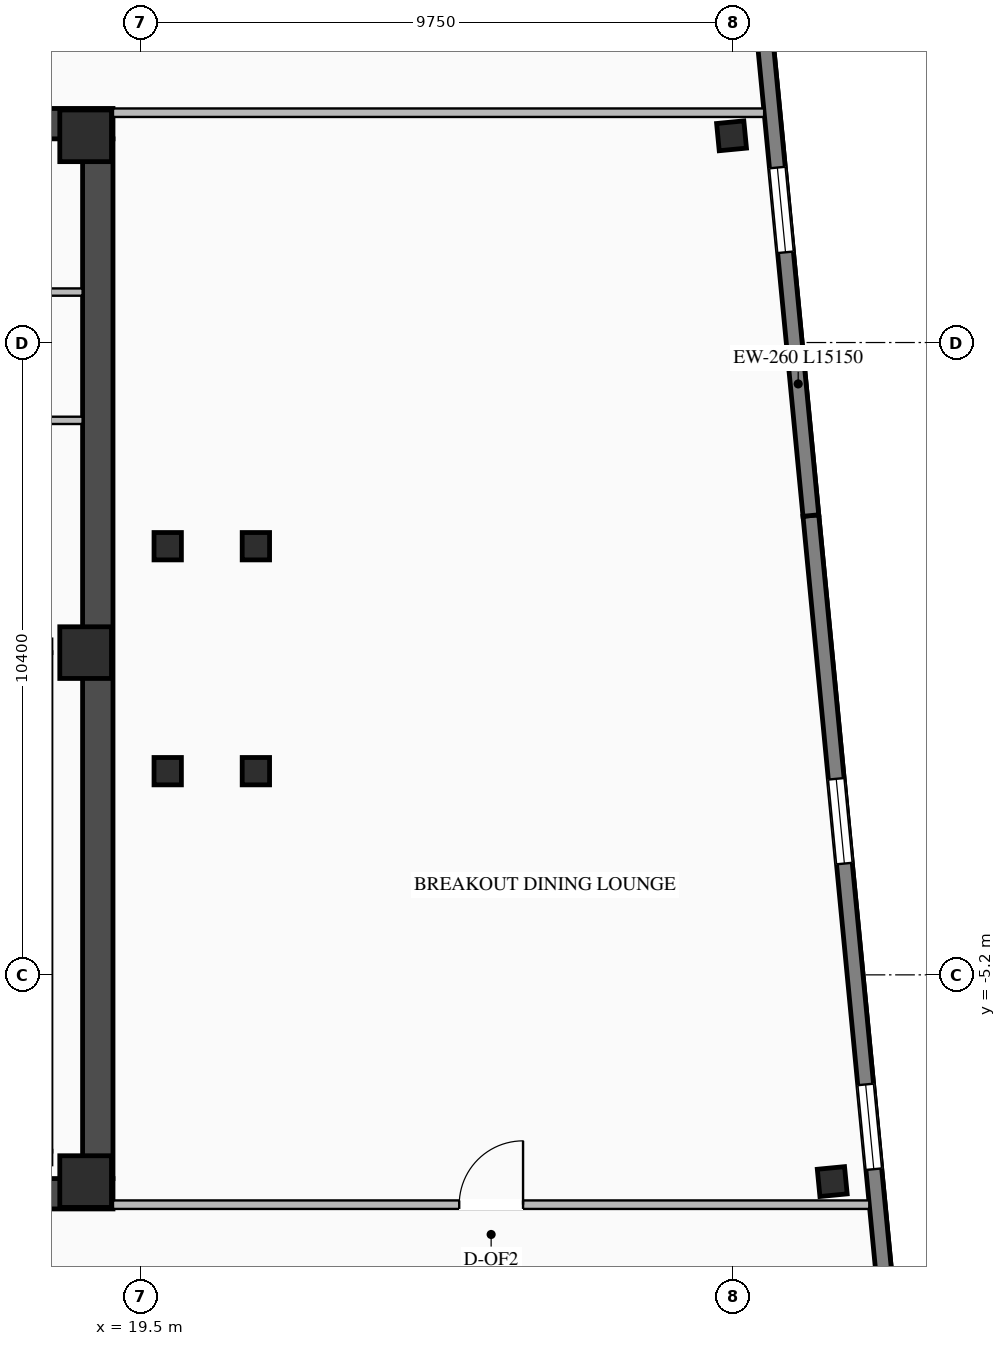
"""IFC4 building model, lengths in metres.
Left out: names, types, materials, properties, quantities, classifications, styles, units other than length and angle.
Written with IfcOpenShell. Run it as: python <this file> out.ifc"""

import sys

from ifc_helpers import new_model, si_unit, direction, frame, frame_2d, origin, origin_2d, place, context, subcontext, project, spatial, rectangle, i_section, extrude, element, fill, save


model = new_model("IFC4")
c1 = context("Model", 3, precision=1e-05, world=origin(), true_north=direction((0.0, 1.0)))
c2 = subcontext(c1, "Body", "Model", "MODEL_VIEW")
j1 = project(units=[si_unit("LENGTHUNIT", "METRE"), si_unit("PLANEANGLEUNIT", "RADIAN")], contexts=[c1])
p1 = place(None, origin())
s1 = spatial("IfcSite", under=j1, at=p1, CompositionType="ELEMENT")
p2 = place(p1, origin())
s2 = spatial("IfcBuilding", under=s1, at=p2, CompositionType="ELEMENT")
p3 = place(p2, frame((0.0, 0.0, 282.75)))
s3 = spatial("IfcBuildingStorey", under=s2, at=p3, CompositionType="ELEMENT", Elevation=282.75)
p4 = place(p3, frame((8.8, -8.8, 0.0), z_axis=(0.0, 0.0, 1.0), x_axis=(1.0, 0.0, 0.0)))
e1 = element("IfcWall", 1, at=p4, inside=s3, PredefinedType="SHEAR", context=c2, shape_type="SweptSolid", body=[
    extrude(rectangle(XDim=10.25, YDim=0.5, at=frame_2d((5.125, 0.0))), origin(), (0.0, 0.0, 1.0), 3.95),
])
p5 = place(p3, frame((8.8, 8.8, 0.0), z_axis=(0.0, 0.0, 1.0), x_axis=(1.0, 0.0, 0.0)))
e2 = element("IfcWall", 2, at=p5, inside=s3, PredefinedType="SHEAR", context=c2, shape_type="SweptSolid", body=[
    extrude(rectangle(XDim=10.25, YDim=0.5, at=frame_2d((5.125, 0.0))), origin(), (0.0, 0.0, 1.0), 3.95),
])
p6 = place(p5, frame((3.25, 0.0, 0.0)))
e3 = element("IfcOpeningElement", 3, at=p6, cuts=e2, PredefinedType="OPENING", context=c2, shape_type="SweptSolid", body=[
    extrude(rectangle(XDim=1.4, YDim=2.05, at=frame_2d((0.7, 1.025))), frame((0.0, 0.26, 0.0), z_axis=(0.0, -1.0, 0.0), x_axis=(1.0, 0.0, 0.0)), (0.0, 0.0, 1.0), 0.52),
])
p7 = place(p3, frame((18.8, -8.55, 0.0), z_axis=(0.0, 0.0, 1.0), x_axis=(0.0, 1.0, 0.0)))
e4 = element("IfcWall", 4, at=p7, inside=s3, PredefinedType="SHEAR", context=c2, shape_type="SweptSolid", body=[
    extrude(rectangle(XDim=17.1, YDim=0.5, at=frame_2d((8.55, 0.0))), origin(), (0.0, 0.0, 1.0), 3.95),
])
for number, where, z_axis, x_axis in (
    (5, (18.6, -8.6, 0.0), (0.0, 0.0, 1.0), (1.0, 0.0, 0.0)),
    (6, (18.6, 0.1, 0.0), (0.0, 0.0, 1.0), (1.0, 0.0, 0.0)),
    (7, (18.6, 8.6, 0.0), (0.0, 0.0, 1.0), (1.0, 0.0, 0.0)),
):
    element("IfcColumn", number, at=place(p3, frame(where, z_axis=z_axis, x_axis=x_axis)), inside=s3, PredefinedType="COLUMN", context=c2, shape_type="SweptSolid", body=[
        extrude(rectangle(XDim=0.85, YDim=0.85, at=origin_2d()), origin(), (0.0, 0.0, 1.0), 4.2),
    ])
for number, where, z_axis, x_axis in (
    (8, (19.95, -1.85, 0.0), (0.0, 0.0, 1.0), (1.0, 0.0, 0.0)),
    (9, (19.95, 1.85, 0.0), (0.0, 0.0, 1.0), (1.0, 0.0, 0.0)),
    (10, (21.4, -1.85, 0.0), (0.0, 0.0, 1.0), (1.0, 0.0, 0.0)),
    (11, (21.4, 1.85, 0.0), (0.0, 0.0, 1.0), (1.0, 0.0, 0.0)),
    (12, (30.879, -8.6, 0.0), (0.0, 0.0, 1.0), (0.995, 0.096, 0.0)),
    (13, (29.223, 8.6, 0.0), (0.0, 0.0, 1.0), (0.995, 0.096, 0.0)),
):
    element("IfcColumn", number, at=place(p3, frame(where, z_axis=z_axis, x_axis=x_axis)), inside=s3, PredefinedType="COLUMN", context=c2, shape_type="SweptSolid", body=[
        extrude(i_section(OverallWidth=0.45, OverallDepth=0.45, WebThickness=0.022, FlangeThickness=0.032, at=origin_2d()), origin(), (0.0, 0.0, 1.0), 4.2),
    ])
p8 = place(p3, frame((30.527, 2.354, 0.0), z_axis=(0.0, 0.0, 1.0), x_axis=(0.095850890337, -0.995395703638, 0.0)))
e14 = element("IfcWall", 14, at=p8, inside=s3, PredefinedType="STANDARD", context=c2, shape_type="SweptSolid", body=[
    extrude(rectangle(XDim=15.15, YDim=0.26, at=frame_2d((7.575, 0.0))), origin(), (0.0, 0.0, 1.0), 3.93),
])
p9 = place(p8, frame((4.35, 0.0, 0.76)))
e15 = element("IfcOpeningElement", 15, at=p9, cuts=e14, PredefinedType="OPENING", context=c2, shape_type="SweptSolid", body=[
    extrude(rectangle(XDim=1.4, YDim=1.95, at=frame_2d((0.7, 0.975))), frame((0.0, 0.14, 0.0), z_axis=(0.0, -1.0, 0.0), x_axis=(1.0, 0.0, 0.0)), (0.0, 0.0, 1.0), 0.28),
])
p10 = place(p8, frame((9.4, 0.0, 0.76)))
e16 = element("IfcOpeningElement", 16, at=p10, cuts=e14, PredefinedType="OPENING", context=c2, shape_type="SweptSolid", body=[
    extrude(rectangle(XDim=1.4, YDim=1.95, at=frame_2d((0.7, 0.975))), frame((0.0, 0.14, 0.0), z_axis=(0.0, -1.0, 0.0), x_axis=(1.0, 0.0, 0.0)), (0.0, 0.0, 1.0), 0.28),
])
p11 = place(p3, frame((29.075, 17.435, 0.0), z_axis=(0.0, 0.0, 1.0), x_axis=(0.095850890337, -0.995395703638, 0.0)))
e17 = element("IfcWall", 17, at=p11, inside=s3, PredefinedType="STANDARD", context=c2, shape_type="SweptSolid", body=[
    extrude(rectangle(XDim=15.15, YDim=0.26, at=frame_2d((7.575, 0.0))), origin(), (0.0, 0.0, 1.0), 3.93),
])
p12 = place(p11, frame((4.35, 0.0, 0.76)))
e18 = element("IfcOpeningElement", 18, at=p12, cuts=e17, PredefinedType="OPENING", context=c2, shape_type="SweptSolid", body=[
    extrude(rectangle(XDim=1.4, YDim=1.95, at=frame_2d((0.7, 0.975))), frame((0.0, 0.14, 0.0), z_axis=(0.0, -1.0, 0.0), x_axis=(1.0, 0.0, 0.0)), (0.0, 0.0, 1.0), 0.28),
])
p13 = place(p11, frame((9.4, 0.0, 0.76)))
e19 = element("IfcOpeningElement", 19, at=p13, cuts=e17, PredefinedType="OPENING", context=c2, shape_type="SweptSolid", body=[
    extrude(rectangle(XDim=1.4, YDim=1.95, at=frame_2d((0.7, 0.975))), frame((0.0, 0.14, 0.0), z_axis=(0.0, -1.0, 0.0), x_axis=(1.0, 0.0, 0.0)), (0.0, 0.0, 1.0), 0.28),
])
p14 = place(p3, frame((13.9, 3.92, 0.0), z_axis=(0.0, 0.0, 1.0), x_axis=(1.0, 0.0, 0.0)))
e20 = element("IfcWall", 20, at=p14, inside=s3, PredefinedType="STANDARD", context=c2, shape_type="SweptSolid", body=[
    extrude(rectangle(XDim=4.65, YDim=0.12, at=frame_2d((2.325, 0.0))), origin(), (0.0, 0.0, 1.0), 3.93),
])
p15 = place(p3, frame((16.15, 6.03, 0.0), z_axis=(0.0, 0.0, 1.0), x_axis=(1.0, 0.0, 0.0)))
e21 = element("IfcWall", 21, at=p15, inside=s3, PredefinedType="STANDARD", context=c2, shape_type="SweptSolid", body=[
    extrude(rectangle(XDim=2.4, YDim=0.12, at=frame_2d((1.2, 0.0))), origin(), (0.0, 0.0, 1.0), 3.93),
])
p16 = place(p3, frame((19.05, 8.98, 0.0), z_axis=(0.0, 0.0, 1.0), x_axis=(1.0, 0.0, 0.0)))
e22 = element("IfcWall", 22, at=p16, inside=s3, PredefinedType="STANDARD", context=c2, shape_type="SweptSolid", body=[
    extrude(rectangle(XDim=10.709, YDim=0.14, at=frame_2d((5.354, 0.0))), origin(), (0.0, 0.0, 1.0), 3.93),
])
p17 = place(p3, frame((19.05, -8.98, 0.0), z_axis=(0.0, 0.0, 1.0), x_axis=(1.0, 0.0, 0.0)))
e23 = element("IfcWall", 23, at=p17, inside=s3, PredefinedType="STANDARD", context=c2, shape_type="SweptSolid", body=[
    extrude(rectangle(XDim=12.438, YDim=0.14, at=frame_2d((6.219, 0.0))), origin(), (0.0, 0.0, 1.0), 3.93),
])
p18 = place(p17, frame((5.694, 0.0, 0.0)))
e24 = element("IfcOpeningElement", 24, at=p18, cuts=e23, PredefinedType="OPENING", context=c2, shape_type="SweptSolid", body=[
    extrude(rectangle(XDim=1.05, YDim=2.08, at=frame_2d((0.525, 1.04))), frame((0.0, 0.08, 0.0), z_axis=(0.0, -1.0, 0.0), x_axis=(1.0, 0.0, 0.0)), (0.0, 0.0, 1.0), 0.16),
])
p19 = place(p9, origin())
e25 = element("IfcWindow", 25, at=p19, inside=s3, PartitioningType="SINGLE_PANEL", PredefinedType="WINDOW", context=c2, shape_type="SweptSolid", body=[
    extrude(rectangle(XDim=1.4, YDim=1.95, at=frame_2d((0.7, 0.975))), frame((0.0, 0.03, 0.0), z_axis=(0.0, -1.0, 0.0), x_axis=(1.0, 0.0, 0.0)), (0.0, 0.0, 1.0), 0.06),
])
fill(e15, e25)
p20 = place(p10, origin())
e26 = element("IfcWindow", 26, at=p20, inside=s3, PartitioningType="SINGLE_PANEL", PredefinedType="WINDOW", context=c2, shape_type="SweptSolid", body=[
    extrude(rectangle(XDim=1.4, YDim=1.95, at=frame_2d((0.7, 0.975))), frame((0.0, 0.03, 0.0), z_axis=(0.0, -1.0, 0.0), x_axis=(1.0, 0.0, 0.0)), (0.0, 0.0, 1.0), 0.06),
])
fill(e16, e26)
p21 = place(p13, origin())
e27 = element("IfcWindow", 27, at=p21, inside=s3, PartitioningType="SINGLE_PANEL", PredefinedType="WINDOW", context=c2, shape_type="SweptSolid", body=[
    extrude(rectangle(XDim=1.4, YDim=1.95, at=frame_2d((0.7, 0.975))), frame((0.0, 0.03, 0.0), z_axis=(0.0, -1.0, 0.0), x_axis=(1.0, 0.0, 0.0)), (0.0, 0.0, 1.0), 0.06),
])
fill(e19, e27)
p22 = place(p18, origin())
e28 = element("IfcDoor", 28, at=p22, inside=s3, OperationType="SINGLE_SWING_RIGHT", PredefinedType="DOOR", context=c2, shape_type="SweptSolid", body=[
    extrude(rectangle(XDim=1.05, YDim=2.08, at=frame_2d((0.525, 1.04))), frame((0.0, 0.025, 0.0), z_axis=(0.0, -1.0, 0.0), x_axis=(1.0, 0.0, 0.0)), (0.0, 0.0, 1.0), 0.05),
])
fill(e24, e28)
save(model, sys.argv[1])
